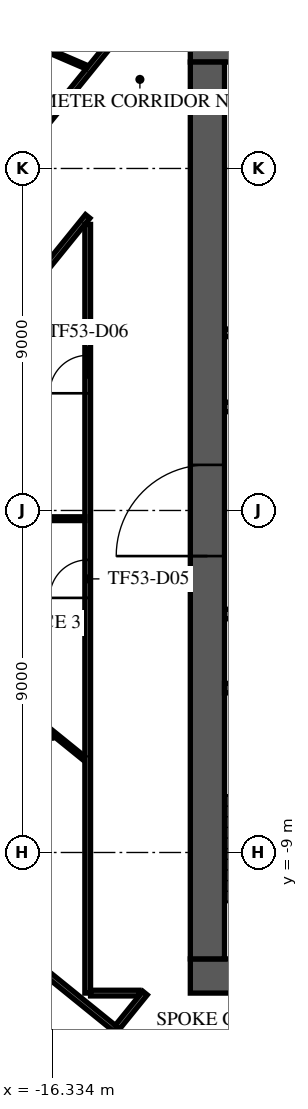
"""IFC4 building model, lengths in metres.
Left out: names, types, materials, properties, quantities, classifications, styles, units other than length and angle.
Written with IfcOpenShell. Run it as: python <this file> out.ifc"""

import sys

from ifc_helpers import new_model, si_unit, direction, frame, frame_2d, origin, place, context, subcontext, project, spatial, rectangle, extrude, element, fill, save


model = new_model("IFC4")
c1 = context("Model", 3, precision=1e-05, world=origin(), true_north=direction((0.0, 1.0)))
c2 = subcontext(c1, "Body", "Model", "MODEL_VIEW")
j1 = project(units=[si_unit("LENGTHUNIT", "METRE"), si_unit("PLANEANGLEUNIT", "RADIAN")], contexts=[c1])
p1 = place(None, origin())
s1 = spatial("IfcSite", under=j1, at=p1, CompositionType="ELEMENT")
p2 = place(p1, origin())
s2 = spatial("IfcBuilding", under=s1, at=p2, CompositionType="ELEMENT")
p3 = place(p2, frame((0.0, 0.0, 225.3)))
s3 = spatial("IfcBuildingStorey", under=s2, at=p3, CompositionType="ELEMENT", Elevation=225.3)
p4 = place(p3, frame((-12.7, 12.25, 0.0), z_axis=(0.0, 0.0, 1.0), x_axis=(1.0, 0.0, 0.0)))
e1 = element("IfcWall", 1, at=p4, inside=s3, PredefinedType="SHEAR", context=c2, shape_type="SweptSolid", body=[
    extrude(rectangle(XDim=25.4, YDim=0.9, at=frame_2d((12.7, 0.0))), origin(), (0.0, 0.0, 1.0), 3.62),
])
p5 = place(p4, frame((11.5, 0.0, 0.0)))
e2 = element("IfcOpeningElement", 2, at=p5, cuts=e1, PredefinedType="OPENING", context=c2, shape_type="SweptSolid", body=[
    extrude(rectangle(XDim=2.4, YDim=2.4, at=frame_2d((1.2, 1.2))), frame((0.0, 0.46, 0.0), z_axis=(0.0, -1.0, 0.0), x_axis=(1.0, 0.0, 0.0)), (0.0, 0.0, 1.0), 0.92),
])
p6 = place(p4, frame((22.325, 0.0, 0.0)))
e3 = element("IfcOpeningElement", 3, at=p6, cuts=e1, PredefinedType="OPENING", context=c2, shape_type="SweptSolid", body=[
    extrude(rectangle(XDim=1.2, YDim=2.1, at=frame_2d((0.6, 1.05))), frame((0.0, 0.46, 0.0), z_axis=(0.0, -1.0, 0.0), x_axis=(1.0, 0.0, 0.0)), (0.0, 0.0, 1.0), 0.92),
])
p7 = place(p4, frame((1.3, 0.0, 0.0)))
e4 = element("IfcOpeningElement", 4, at=p7, cuts=e1, PredefinedType="OPENING", context=c2, shape_type="SweptSolid", body=[
    extrude(rectangle(XDim=1.0, YDim=2.1, at=frame_2d((0.5, 1.05))), frame((0.0, 0.46, 0.0), z_axis=(0.0, -1.0, 0.0), x_axis=(1.0, 0.0, 0.0)), (0.0, 0.0, 1.0), 0.92),
])
p8 = place(p3, frame((-12.7, -12.25, 0.0), z_axis=(0.0, 0.0, 1.0), x_axis=(1.0, 0.0, 0.0)))
e5 = element("IfcWall", 5, at=p8, inside=s3, PredefinedType="SHEAR", context=c2, shape_type="SweptSolid", body=[
    extrude(rectangle(XDim=25.4, YDim=0.9, at=frame_2d((12.7, 0.0))), origin(), (0.0, 0.0, 1.0), 3.62),
])
p9 = place(p8, frame((7.6, 0.0, 0.0)))
e6 = element("IfcOpeningElement", 6, at=p9, cuts=e5, PredefinedType="OPENING", context=c2, shape_type="SweptSolid", body=[
    extrude(rectangle(XDim=2.0, YDim=2.1, at=frame_2d((1.0, 1.05))), frame((0.0, 0.46, 0.0), z_axis=(0.0, -1.0, 0.0), x_axis=(1.0, 0.0, 0.0)), (0.0, 0.0, 1.0), 0.92),
])
p10 = place(p8, frame((17.725, 0.0, 0.0)))
e7 = element("IfcOpeningElement", 7, at=p10, cuts=e5, PredefinedType="OPENING", context=c2, shape_type="SweptSolid", body=[
    extrude(rectangle(XDim=1.2, YDim=2.1, at=frame_2d((0.6, 1.05))), frame((0.0, 0.46, 0.0), z_axis=(0.0, -1.0, 0.0), x_axis=(1.0, 0.0, 0.0)), (0.0, 0.0, 1.0), 0.92),
])
p11 = place(p8, frame((1.875, 0.0, 0.0)))
e8 = element("IfcOpeningElement", 8, at=p11, cuts=e5, PredefinedType="OPENING", context=c2, shape_type="SweptSolid", body=[
    extrude(rectangle(XDim=1.2, YDim=2.1, at=frame_2d((0.6, 1.05))), frame((0.0, 0.46, 0.0), z_axis=(0.0, -1.0, 0.0), x_axis=(1.0, 0.0, 0.0)), (0.0, 0.0, 1.0), 0.92),
])
p12 = place(p8, frame((22.325, 0.0, 0.0)))
e9 = element("IfcOpeningElement", 9, at=p12, cuts=e5, PredefinedType="OPENING", context=c2, shape_type="SweptSolid", body=[
    extrude(rectangle(XDim=1.2, YDim=2.1, at=frame_2d((0.6, 1.05))), frame((0.0, 0.46, 0.0), z_axis=(0.0, -1.0, 0.0), x_axis=(1.0, 0.0, 0.0)), (0.0, 0.0, 1.0), 0.92),
])
p13 = place(p3, frame((-12.25, -11.8, 0.0), z_axis=(0.0, 0.0, 1.0), x_axis=(0.0, 1.0, 0.0)))
e10 = element("IfcWall", 10, at=p13, inside=s3, PredefinedType="SHEAR", context=c2, shape_type="SweptSolid", body=[
    extrude(rectangle(XDim=23.6, YDim=0.9, at=frame_2d((11.8, 0.0))), origin(), (0.0, 0.0, 1.0), 3.62),
])
p14 = place(p13, frame((10.6, 0.0, 0.0)))
e11 = element("IfcOpeningElement", 11, at=p14, cuts=e10, PredefinedType="OPENING", context=c2, shape_type="SweptSolid", body=[
    extrude(rectangle(XDim=2.4, YDim=2.4, at=frame_2d((1.2, 1.2))), frame((0.0, 0.46, 0.0), z_axis=(0.0, -1.0, 0.0), x_axis=(1.0, 0.0, 0.0)), (0.0, 0.0, 1.0), 0.92),
])
p15 = place(p3, frame((-8.65, -4.675, 0.0), z_axis=(0.0, 0.0, 1.0), x_axis=(-1.0, 0.0, 0.0)))
e12 = element("IfcWall", 12, at=p15, inside=s3, PredefinedType="SOLIDWALL", context=c2, shape_type="SweptSolid", body=[
    extrude(rectangle(XDim=3.15, YDim=0.25, at=frame_2d((1.575, 0.0))), origin(), (0.0, 0.0, 1.0), 3.62),
])
p16 = place(p3, frame((-11.795, -2.725, 0.0), z_axis=(0.0, 0.0, 1.0), x_axis=(1.0, 0.0, 0.0)))
e13 = element("IfcWall", 13, at=p16, inside=s3, PredefinedType="PARTITIONING", context=c2, shape_type="SweptSolid", body=[
    extrude(rectangle(XDim=8.915, YDim=0.25, at=frame_2d((4.458, 0.0))), origin(), (0.0, 0.0, 1.0), 3.62),
])
p17 = place(p16, frame((1.295, 0.0, 0.0)))
e14 = element("IfcOpeningElement", 14, at=p17, cuts=e13, PredefinedType="OPENING", context=c2, shape_type="SweptSolid", body=[
    extrude(rectangle(XDim=1.0, YDim=2.1, at=frame_2d((0.5, 1.05))), frame((0.0, 0.135, 0.0), z_axis=(0.0, -1.0, 0.0), x_axis=(1.0, 0.0, 0.0)), (0.0, 0.0, 1.0), 0.27),
])
p18 = place(p16, frame((4.42, 0.0, 0.0)))
e15 = element("IfcOpeningElement", 15, at=p18, cuts=e13, PredefinedType="OPENING", context=c2, shape_type="SweptSolid", body=[
    extrude(rectangle(XDim=1.0, YDim=2.1, at=frame_2d((0.5, 1.05))), frame((0.0, 0.135, 0.0), z_axis=(0.0, -1.0, 0.0), x_axis=(1.0, 0.0, 0.0)), (0.0, 0.0, 1.0), 0.27),
])
p19 = place(p3, frame((-11.795, 2.725, 0.0), z_axis=(0.0, 0.0, 1.0), x_axis=(1.0, 0.0, 0.0)))
e16 = element("IfcWall", 16, at=p19, inside=s3, PredefinedType="PARTITIONING", context=c2, shape_type="SweptSolid", body=[
    extrude(rectangle(XDim=3.415, YDim=0.25, at=frame_2d((1.708, 0.0))), origin(), (0.0, 0.0, 1.0), 3.62),
])
p20 = place(p19, frame((1.345, 0.0, 0.0)))
e17 = element("IfcOpeningElement", 17, at=p20, cuts=e16, PredefinedType="OPENING", context=c2, shape_type="SweptSolid", body=[
    extrude(rectangle(XDim=0.9, YDim=2.1, at=frame_2d((0.45, 1.05))), frame((0.0, 0.135, 0.0), z_axis=(0.0, -1.0, 0.0), x_axis=(1.0, 0.0, 0.0)), (0.0, 0.0, 1.0), 0.27),
])
p21 = place(p3, frame((-11.795, 4.675, 0.0), z_axis=(0.0, 0.0, 1.0), x_axis=(1.0, 0.0, 0.0)))
e18 = element("IfcWall", 18, at=p21, inside=s3, PredefinedType="PARTITIONING", context=c2, shape_type="SweptSolid", body=[
    extrude(rectangle(XDim=3.415, YDim=0.2, at=frame_2d((1.708, 0.0))), origin(), (0.0, 0.0, 1.0), 3.62),
])
p22 = place(p3, frame((-3.777, 34.584, 0.0), z_axis=(0.0, 0.0, 1.0), x_axis=(-0.629323778295, -0.777143218508, 0.0)))
e19 = element("IfcWall", 19, at=p22, inside=s3, PredefinedType="STANDARD", context=c2, shape_type="SweptSolid", body=[
    extrude(rectangle(XDim=49.0, YDim=0.6, at=frame_2d((24.5, 0.0))), origin(), (0.0, 0.0, 1.0), 3.62),
])
p23 = place(p22, frame((1.227, 0.0, 0.9)))
e20 = element("IfcOpeningElement", 20, at=p23, cuts=e19, PredefinedType="OPENING", context=c2, shape_type="SweptSolid", body=[
    extrude(rectangle(XDim=2.0, YDim=2.1, at=frame_2d((1.0, 1.05))), frame((0.0, 0.31, 0.0), z_axis=(0.0, -1.0, 0.0), x_axis=(1.0, 0.0, 0.0)), (0.0, 0.0, 1.0), 0.62),
])
p24 = place(p22, frame((5.682, 0.0, 0.9)))
e21 = element("IfcOpeningElement", 21, at=p24, cuts=e19, PredefinedType="OPENING", context=c2, shape_type="SweptSolid", body=[
    extrude(rectangle(XDim=2.0, YDim=2.1, at=frame_2d((1.0, 1.05))), frame((0.0, 0.31, 0.0), z_axis=(0.0, -1.0, 0.0), x_axis=(1.0, 0.0, 0.0)), (0.0, 0.0, 1.0), 0.62),
])
p25 = place(p22, frame((10.136, 0.0, 0.9)))
e22 = element("IfcOpeningElement", 22, at=p25, cuts=e19, PredefinedType="OPENING", context=c2, shape_type="SweptSolid", body=[
    extrude(rectangle(XDim=2.0, YDim=2.1, at=frame_2d((1.0, 1.05))), frame((0.0, 0.31, 0.0), z_axis=(0.0, -1.0, 0.0), x_axis=(1.0, 0.0, 0.0)), (0.0, 0.0, 1.0), 0.62),
])
p26 = place(p22, frame((14.591, 0.0, 0.9)))
e23 = element("IfcOpeningElement", 23, at=p26, cuts=e19, PredefinedType="OPENING", context=c2, shape_type="SweptSolid", body=[
    extrude(rectangle(XDim=2.0, YDim=2.1, at=frame_2d((1.0, 1.05))), frame((0.0, 0.31, 0.0), z_axis=(0.0, -1.0, 0.0), x_axis=(1.0, 0.0, 0.0)), (0.0, 0.0, 1.0), 0.62),
])
p27 = place(p22, frame((19.045, 0.0, 0.9)))
e24 = element("IfcOpeningElement", 24, at=p27, cuts=e19, PredefinedType="OPENING", context=c2, shape_type="SweptSolid", body=[
    extrude(rectangle(XDim=2.0, YDim=2.1, at=frame_2d((1.0, 1.05))), frame((0.0, 0.31, 0.0), z_axis=(0.0, -1.0, 0.0), x_axis=(1.0, 0.0, 0.0)), (0.0, 0.0, 1.0), 0.62),
])
p28 = place(p22, frame((23.5, 0.0, 0.9)))
e25 = element("IfcOpeningElement", 25, at=p28, cuts=e19, PredefinedType="OPENING", context=c2, shape_type="SweptSolid", body=[
    extrude(rectangle(XDim=2.0, YDim=2.1, at=frame_2d((1.0, 1.05))), frame((0.0, 0.31, 0.0), z_axis=(0.0, -1.0, 0.0), x_axis=(1.0, 0.0, 0.0)), (0.0, 0.0, 1.0), 0.62),
])
p29 = place(p22, frame((27.955, 0.0, 0.9)))
e26 = element("IfcOpeningElement", 26, at=p29, cuts=e19, PredefinedType="OPENING", context=c2, shape_type="SweptSolid", body=[
    extrude(rectangle(XDim=2.0, YDim=2.1, at=frame_2d((1.0, 1.05))), frame((0.0, 0.31, 0.0), z_axis=(0.0, -1.0, 0.0), x_axis=(1.0, 0.0, 0.0)), (0.0, 0.0, 1.0), 0.62),
])
p30 = place(p22, frame((32.409, 0.0, 0.9)))
e27 = element("IfcOpeningElement", 27, at=p30, cuts=e19, PredefinedType="OPENING", context=c2, shape_type="SweptSolid", body=[
    extrude(rectangle(XDim=2.0, YDim=2.1, at=frame_2d((1.0, 1.05))), frame((0.0, 0.31, 0.0), z_axis=(0.0, -1.0, 0.0), x_axis=(1.0, 0.0, 0.0)), (0.0, 0.0, 1.0), 0.62),
])
p31 = place(p22, frame((36.864, 0.0, 0.9)))
e28 = element("IfcOpeningElement", 28, at=p31, cuts=e19, PredefinedType="OPENING", context=c2, shape_type="SweptSolid", body=[
    extrude(rectangle(XDim=2.0, YDim=2.1, at=frame_2d((1.0, 1.05))), frame((0.0, 0.31, 0.0), z_axis=(0.0, -1.0, 0.0), x_axis=(1.0, 0.0, 0.0)), (0.0, 0.0, 1.0), 0.62),
])
p32 = place(p22, frame((41.318, 0.0, 0.9)))
e29 = element("IfcOpeningElement", 29, at=p32, cuts=e19, PredefinedType="OPENING", context=c2, shape_type="SweptSolid", body=[
    extrude(rectangle(XDim=2.0, YDim=2.1, at=frame_2d((1.0, 1.05))), frame((0.0, 0.31, 0.0), z_axis=(0.0, -1.0, 0.0), x_axis=(1.0, 0.0, 0.0)), (0.0, 0.0, 1.0), 0.62),
])
p33 = place(p22, frame((45.773, 0.0, 0.9)))
e30 = element("IfcOpeningElement", 30, at=p33, cuts=e19, PredefinedType="OPENING", context=c2, shape_type="SweptSolid", body=[
    extrude(rectangle(XDim=2.0, YDim=2.1, at=frame_2d((1.0, 1.05))), frame((0.0, 0.31, 0.0), z_axis=(0.0, -1.0, 0.0), x_axis=(1.0, 0.0, 0.0)), (0.0, 0.0, 1.0), 0.62),
])
p34 = place(p3, frame((-33.845, -10.81, 0.0), z_axis=(0.0, 0.0, 1.0), x_axis=(0.777145437972, -0.629321037499, 0.0)))
e31 = element("IfcWall", 31, at=p34, inside=s3, PredefinedType="STANDARD", context=c2, shape_type="SweptSolid", body=[
    extrude(rectangle(XDim=39.0, YDim=0.6, at=frame_2d((19.5, 0.0))), origin(), (0.0, 0.0, 1.0), 3.62),
])
p35 = place(p34, frame((1.217, 0.0, 0.9)))
e32 = element("IfcOpeningElement", 32, at=p35, cuts=e31, PredefinedType="OPENING", context=c2, shape_type="SweptSolid", body=[
    extrude(rectangle(XDim=1.9, YDim=2.1, at=frame_2d((0.95, 1.05))), frame((0.0, 0.31, 0.0), z_axis=(0.0, -1.0, 0.0), x_axis=(1.0, 0.0, 0.0)), (0.0, 0.0, 1.0), 0.62),
])
p36 = place(p34, frame((5.55, 0.0, 0.9)))
e33 = element("IfcOpeningElement", 33, at=p36, cuts=e31, PredefinedType="OPENING", context=c2, shape_type="SweptSolid", body=[
    extrude(rectangle(XDim=1.9, YDim=2.1, at=frame_2d((0.95, 1.05))), frame((0.0, 0.31, 0.0), z_axis=(0.0, -1.0, 0.0), x_axis=(1.0, 0.0, 0.0)), (0.0, 0.0, 1.0), 0.62),
])
p37 = place(p34, frame((9.883, 0.0, 0.9)))
e34 = element("IfcOpeningElement", 34, at=p37, cuts=e31, PredefinedType="OPENING", context=c2, shape_type="SweptSolid", body=[
    extrude(rectangle(XDim=1.9, YDim=2.1, at=frame_2d((0.95, 1.05))), frame((0.0, 0.31, 0.0), z_axis=(0.0, -1.0, 0.0), x_axis=(1.0, 0.0, 0.0)), (0.0, 0.0, 1.0), 0.62),
])
p38 = place(p34, frame((14.217, 0.0, 0.9)))
e35 = element("IfcOpeningElement", 35, at=p38, cuts=e31, PredefinedType="OPENING", context=c2, shape_type="SweptSolid", body=[
    extrude(rectangle(XDim=1.9, YDim=2.1, at=frame_2d((0.95, 1.05))), frame((0.0, 0.31, 0.0), z_axis=(0.0, -1.0, 0.0), x_axis=(1.0, 0.0, 0.0)), (0.0, 0.0, 1.0), 0.62),
])
p39 = place(p34, frame((18.55, 0.0, 0.9)))
e36 = element("IfcOpeningElement", 36, at=p39, cuts=e31, PredefinedType="OPENING", context=c2, shape_type="SweptSolid", body=[
    extrude(rectangle(XDim=1.9, YDim=2.1, at=frame_2d((0.95, 1.05))), frame((0.0, 0.31, 0.0), z_axis=(0.0, -1.0, 0.0), x_axis=(1.0, 0.0, 0.0)), (0.0, 0.0, 1.0), 0.62),
])
p40 = place(p34, frame((22.883, 0.0, 0.9)))
e37 = element("IfcOpeningElement", 37, at=p40, cuts=e31, PredefinedType="OPENING", context=c2, shape_type="SweptSolid", body=[
    extrude(rectangle(XDim=1.9, YDim=2.1, at=frame_2d((0.95, 1.05))), frame((0.0, 0.31, 0.0), z_axis=(0.0, -1.0, 0.0), x_axis=(1.0, 0.0, 0.0)), (0.0, 0.0, 1.0), 0.62),
])
p41 = place(p34, frame((27.217, 0.0, 0.9)))
e38 = element("IfcOpeningElement", 38, at=p41, cuts=e31, PredefinedType="OPENING", context=c2, shape_type="SweptSolid", body=[
    extrude(rectangle(XDim=1.9, YDim=2.1, at=frame_2d((0.95, 1.05))), frame((0.0, 0.31, 0.0), z_axis=(0.0, -1.0, 0.0), x_axis=(1.0, 0.0, 0.0)), (0.0, 0.0, 1.0), 0.62),
])
p42 = place(p34, frame((31.55, 0.0, 0.9)))
e39 = element("IfcOpeningElement", 39, at=p42, cuts=e31, PredefinedType="OPENING", context=c2, shape_type="SweptSolid", body=[
    extrude(rectangle(XDim=1.9, YDim=2.1, at=frame_2d((0.95, 1.05))), frame((0.0, 0.31, 0.0), z_axis=(0.0, -1.0, 0.0), x_axis=(1.0, 0.0, 0.0)), (0.0, 0.0, 1.0), 0.62),
])
p43 = place(p34, frame((35.883, 0.0, 0.9)))
e40 = element("IfcOpeningElement", 40, at=p43, cuts=e31, PredefinedType="OPENING", context=c2, shape_type="SweptSolid", body=[
    extrude(rectangle(XDim=1.9, YDim=2.1, at=frame_2d((0.95, 1.05))), frame((0.0, 0.31, 0.0), z_axis=(0.0, -1.0, 0.0), x_axis=(1.0, 0.0, 0.0)), (0.0, 0.0, 1.0), 0.62),
])
p44 = place(p3, frame((-26.769, -2.487, 0.0), z_axis=(0.0, 0.0, 1.0), x_axis=(0.629320703929, 0.777145708092, 0.0)))
e41 = element("IfcWall", 41, at=p44, inside=s3, PredefinedType="PARTITIONING", context=c2, shape_type="SweptSolid", body=[
    extrude(rectangle(XDim=37.558, YDim=0.15, at=frame_2d((18.779, 0.0))), origin(), (0.0, 0.0, 1.0), 2.97),
])
p45 = place(p44, frame((3.55, 0.0, 0.0)))
e42 = element("IfcOpeningElement", 42, at=p45, cuts=e41, PredefinedType="OPENING", context=c2, shape_type="SweptSolid", body=[
    extrude(rectangle(XDim=1.0, YDim=2.1, at=frame_2d((0.5, 1.05))), frame((0.0, 0.085, 0.0), z_axis=(0.0, -1.0, 0.0), x_axis=(1.0, 0.0, 0.0)), (0.0, 0.0, 1.0), 0.17),
])
p46 = place(p44, frame((11.862, 0.0, 0.0)))
e43 = element("IfcOpeningElement", 43, at=p46, cuts=e41, PredefinedType="OPENING", context=c2, shape_type="SweptSolid", body=[
    extrude(rectangle(XDim=1.0, YDim=2.1, at=frame_2d((0.5, 1.05))), frame((0.0, 0.085, 0.0), z_axis=(0.0, -1.0, 0.0), x_axis=(1.0, 0.0, 0.0)), (0.0, 0.0, 1.0), 0.17),
])
p47 = place(p44, frame((21.452, 0.0, 0.0)))
e44 = element("IfcOpeningElement", 44, at=p47, cuts=e41, PredefinedType="OPENING", context=c2, shape_type="SweptSolid", body=[
    extrude(rectangle(XDim=1.0, YDim=2.1, at=frame_2d((0.5, 1.05))), frame((0.0, 0.085, 0.0), z_axis=(0.0, -1.0, 0.0), x_axis=(1.0, 0.0, 0.0)), (0.0, 0.0, 1.0), 0.17),
])
p48 = place(p44, frame((31.223, 0.0, 0.0)))
e45 = element("IfcOpeningElement", 45, at=p48, cuts=e41, PredefinedType="OPENING", context=c2, shape_type="SweptSolid", body=[
    extrude(rectangle(XDim=1.0, YDim=2.1, at=frame_2d((0.5, 1.05))), frame((0.0, 0.085, 0.0), z_axis=(0.0, -1.0, 0.0), x_axis=(1.0, 0.0, 0.0)), (0.0, 0.0, 1.0), 0.17),
])
p49 = place(p44, frame((35.359, 0.0, 0.0)))
e46 = element("IfcOpeningElement", 46, at=p49, cuts=e41, PredefinedType="OPENING", context=c2, shape_type="SweptSolid", body=[
    extrude(rectangle(XDim=1.0, YDim=2.1, at=frame_2d((0.5, 1.05))), frame((0.0, 0.085, 0.0), z_axis=(0.0, -1.0, 0.0), x_axis=(1.0, 0.0, 0.0)), (0.0, 0.0, 1.0), 0.17),
])
p50 = place(p3, frame((-24.857, -3.939, 0.0), z_axis=(0.0, 0.0, 1.0), x_axis=(0.629334227899, 0.777134756393, 0.0)))
e47 = element("IfcWall", 47, at=p50, inside=s3, PredefinedType="PARTITIONING", context=c2, shape_type="SweptSolid", body=[
    extrude(rectangle(XDim=15.027, YDim=0.15, at=frame_2d((7.513, 0.0))), origin(), (0.0, 0.0, 1.0), 3.17),
])
p51 = place(p3, frame((-24.374, -8.878, 0.0), z_axis=(0.0, 0.0, 1.0), x_axis=(0.777132572121, -0.629336925143, 0.0)))
e48 = element("IfcWall", 48, at=p51, inside=s3, PredefinedType="PARTITIONING", context=c2, shape_type="SweptSolid", body=[
    extrude(rectangle(XDim=26.785, YDim=0.15, at=frame_2d((13.393, 0.0))), origin(), (0.0, 0.0, 1.0), 3.17),
])
p52 = place(p51, frame((1.3, 0.0, 0.0)))
e49 = element("IfcOpeningElement", 49, at=p52, cuts=e48, PredefinedType="OPENING", context=c2, shape_type="SweptSolid", body=[
    extrude(rectangle(XDim=1.0, YDim=2.1, at=frame_2d((0.5, 1.05))), frame((0.0, 0.085, 0.0), z_axis=(0.0, -1.0, 0.0), x_axis=(1.0, 0.0, 0.0)), (0.0, 0.0, 1.0), 0.17),
])
p53 = place(p51, frame((5.461, 0.0, 0.0)))
e50 = element("IfcOpeningElement", 50, at=p53, cuts=e48, PredefinedType="OPENING", context=c2, shape_type="SweptSolid", body=[
    extrude(rectangle(XDim=1.0, YDim=2.1, at=frame_2d((0.5, 1.05))), frame((0.0, 0.085, 0.0), z_axis=(0.0, -1.0, 0.0), x_axis=(1.0, 0.0, 0.0)), (0.0, 0.0, 1.0), 0.17),
])
p54 = place(p51, frame((11.587, 0.0, 0.0)))
e51 = element("IfcOpeningElement", 51, at=p54, cuts=e48, PredefinedType="OPENING", context=c2, shape_type="SweptSolid", body=[
    extrude(rectangle(XDim=1.0, YDim=2.1, at=frame_2d((0.5, 1.05))), frame((0.0, 0.085, 0.0), z_axis=(0.0, -1.0, 0.0), x_axis=(1.0, 0.0, 0.0)), (0.0, 0.0, 1.0), 0.17),
])
p55 = place(p3, frame((-22.922, -6.965, 0.0), z_axis=(0.0, 0.0, 1.0), x_axis=(0.777148029431, -0.629317837306, 0.0)))
e52 = element("IfcWall", 52, at=p55, inside=s3, PredefinedType="PARTITIONING", context=c2, shape_type="SweptSolid", body=[
    extrude(rectangle(XDim=10.627, YDim=0.15, at=frame_2d((5.314, 0.0))), origin(), (0.0, 0.0, 1.0), 3.17),
])
p56 = place(p3, frame((-15.4, -12.7, 0.0), z_axis=(0.0, 0.0, 1.0), x_axis=(0.0, 1.0, 0.0)))
e53 = element("IfcWall", 53, at=p56, inside=s3, PredefinedType="PARTITIONING", context=c2, shape_type="SweptSolid", body=[
    extrude(rectangle(XDim=20.227, YDim=0.15, at=frame_2d((10.114, 0.0))), origin(), (0.0, 0.0, 1.0), 3.17),
])
p57 = place(p56, frame((10.4, 0.0, 0.0)))
e54 = element("IfcOpeningElement", 54, at=p57, cuts=e53, PredefinedType="OPENING", context=c2, shape_type="SweptSolid", body=[
    extrude(rectangle(XDim=1.0, YDim=2.1, at=frame_2d((0.5, 1.05))), frame((0.0, 0.085, 0.0), z_axis=(0.0, -1.0, 0.0), x_axis=(1.0, 0.0, 0.0)), (0.0, 0.0, 1.0), 0.17),
])
p58 = place(p56, frame((15.784, 0.0, 0.0)))
e55 = element("IfcOpeningElement", 55, at=p58, cuts=e53, PredefinedType="OPENING", context=c2, shape_type="SweptSolid", body=[
    extrude(rectangle(XDim=1.0, YDim=2.1, at=frame_2d((0.5, 1.05))), frame((0.0, 0.085, 0.0), z_axis=(0.0, -1.0, 0.0), x_axis=(1.0, 0.0, 0.0)), (0.0, 0.0, 1.0), 0.17),
])
p59 = place(p3, frame((-15.325, -12.7, 0.0), z_axis=(0.0, 0.0, 1.0), x_axis=(1.0, 0.0, 0.0)))
e56 = element("IfcWall", 56, at=p59, inside=s3, PredefinedType="PARTITIONING", context=c2, shape_type="SweptSolid", body=[
    extrude(rectangle(XDim=1.277, YDim=0.15, at=frame_2d((0.638, 0.0))), origin(), (0.0, 0.0, 1.0), 3.17),
])
p60 = place(p3, frame((-14.616, -13.595, 0.0), z_axis=(0.0, 0.0, 1.0), x_axis=(0.629338514223, 0.777131285251, 0.0)))
e57 = element("IfcWall", 57, at=p60, inside=s3, PredefinedType="PARTITIONING", context=c2, shape_type="SweptSolid", body=[
    extrude(rectangle(XDim=1.151, YDim=0.15, at=frame_2d((0.576, 0.0))), origin(), (0.0, 0.0, 1.0), 3.17),
])
p61 = place(p3, frame((-22.355, -0.968, 0.0), z_axis=(0.0, 0.0, 1.0), x_axis=(0.777138402267, -0.629329725757, 0.0)))
e58 = element("IfcWall", 58, at=p61, inside=s3, PredefinedType="PARTITIONING", context=c2, shape_type="SweptSolid", body=[
    extrude(rectangle(XDim=8.812, YDim=0.1, at=frame_2d((4.406, 0.0))), origin(), (0.0, 0.0, 1.0), 3.17),
])
p62 = place(p3, frame((-21.705, -0.216, 0.0), z_axis=(0.0, 0.0, 1.0), x_axis=(1.0, 0.0, 0.0)))
e59 = element("IfcWall", 59, at=p62, inside=s3, PredefinedType="PARTITIONING", context=c2, shape_type="SweptSolid", body=[
    extrude(rectangle(XDim=6.23, YDim=0.1, at=frame_2d((3.115, 0.0))), origin(), (0.0, 0.0, 1.0), 3.62),
])
p63 = place(p3, frame((-20.259, 13.751, 0.0), z_axis=(0.0, 0.0, 1.0), x_axis=(0.918139792182, -0.396256636553, 0.0)))
e60 = element("IfcWall", 60, at=p63, inside=s3, PredefinedType="PARTITIONING", context=c2, shape_type="SweptSolid", body=[
    extrude(rectangle(XDim=5.267, YDim=0.1, at=frame_2d((2.633, 0.0))), origin(), (0.0, 0.0, 1.0), 2.97),
])
p64 = place(p14, origin())
e61 = element("IfcDoor", 61, at=p64, inside=s3, OperationType="SINGLE_SWING_LEFT", PredefinedType="DOOR", context=c2, shape_type="SweptSolid", body=[
    extrude(rectangle(XDim=2.4, YDim=2.4, at=frame_2d((1.2, 1.2))), frame((0.0, 0.025, 0.0), z_axis=(0.0, -1.0, 0.0), x_axis=(1.0, 0.0, 0.0)), (0.0, 0.0, 1.0), 0.05),
])
fill(e11, e61)
p65 = place(p57, origin())
e62 = element("IfcDoor", 62, at=p65, inside=s3, OperationType="SINGLE_SWING_RIGHT", PredefinedType="DOOR", context=c2, shape_type="SweptSolid", body=[
    extrude(rectangle(XDim=1.0, YDim=2.1, at=frame_2d((0.5, 1.05))), frame((0.0, 0.025, 0.0), z_axis=(0.0, -1.0, 0.0), x_axis=(1.0, 0.0, 0.0)), (0.0, 0.0, 1.0), 0.05),
])
fill(e54, e62)
p66 = place(p58, origin())
e63 = element("IfcDoor", 63, at=p66, inside=s3, OperationType="SINGLE_SWING_LEFT", PredefinedType="DOOR", context=c2, shape_type="SweptSolid", body=[
    extrude(rectangle(XDim=1.0, YDim=2.1, at=frame_2d((0.5, 1.05))), frame((0.0, 0.025, 0.0), z_axis=(0.0, -1.0, 0.0), x_axis=(1.0, 0.0, 0.0)), (0.0, 0.0, 1.0), 0.05),
])
fill(e55, e63)
save(model, sys.argv[1])
